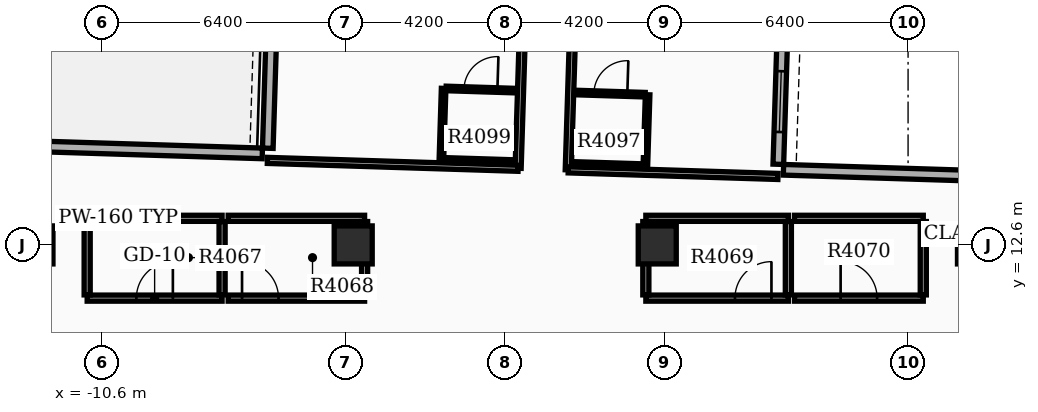
"""IFC4 building model, lengths in metres.
Left out: names, types, materials, properties, quantities, classifications, styles, units other than length and angle.
Written with IfcOpenShell. Run it as: python <this file> out.ifc"""

import sys

from ifc_helpers import new_model, si_unit, direction, frame, frame_2d, origin, origin_2d, place, context, subcontext, project, spatial, rectangle, extrude, element, fill, save


model = new_model("IFC4")
c1 = context("Model", 3, precision=1e-05, world=origin(), true_north=direction((0.0, 1.0)))
c2 = subcontext(c1, "Body", "Model", "MODEL_VIEW")
j1 = project(units=[si_unit("LENGTHUNIT", "METRE"), si_unit("PLANEANGLEUNIT", "RADIAN")], contexts=[c1])
p1 = place(None, origin())
s1 = spatial("IfcSite", under=j1, at=p1, CompositionType="ELEMENT")
p2 = place(p1, origin())
s2 = spatial("IfcBuilding", under=s1, at=p2, CompositionType="ELEMENT")
p3 = place(p2, frame((0.0, 0.0, 257.7)))
s3 = spatial("IfcBuildingStorey", under=s2, at=p3, CompositionType="ELEMENT", Elevation=257.7)
for number, where, z_axis, x_axis in (
    (1, (12.4, 12.6, 0.0), (0.0, 0.0, 1.0), (1.0, 0.0, 0.0)),
    (2, (-12.4, 12.6, 0.0), (0.0, 0.0, 1.0), (1.0, 0.0, 0.0)),
    (3, (4.0, 12.6, 0.0), (0.0, 0.0, 1.0), (1.0, 0.0, 0.0)),
    (4, (-4.0, 12.6, 0.0), (0.0, 0.0, 1.0), (1.0, 0.0, 0.0)),
):
    element("IfcColumn", number, at=place(p3, frame(where, z_axis=z_axis, x_axis=x_axis)), inside=s3, PredefinedType="COLUMN", context=c2, shape_type="SweptSolid", body=[
        extrude(rectangle(XDim=1.0, YDim=1.0, at=origin_2d()), origin(), (0.0, 0.0, 1.0), 3.9),
    ])
p4 = place(p3, frame((7.186, 14.721, 0.0), z_axis=(0.0, 0.0, 1.0), x_axis=(0.031405855522, 0.999506714454, 0.0)))
e5 = element("IfcWall", 5, at=p4, inside=s3, PredefinedType="STANDARD", context=c2, shape_type="SweptSolid", body=[
    extrude(rectangle(XDim=14.7, YDim=0.28, at=frame_2d((7.35, 0.0))), origin(), (0.0, 0.0, 1.0), 3.18),
])
p5 = place(p4, frame((0.85, 0.0, 0.8)))
e6 = element("IfcOpeningElement", 6, at=p5, cuts=e5, PredefinedType="OPENING", context=c2, shape_type="SweptSolid", body=[
    extrude(rectangle(XDim=1.6, YDim=1.7, at=frame_2d((0.8, 0.85))), frame((0.0, 0.15, 0.0), z_axis=(0.0, -1.0, 0.0), x_axis=(1.0, 0.0, 0.0)), (0.0, 0.0, 1.0), 0.3),
])
p6 = place(p4, frame((4.05, 0.0, 0.8)))
e7 = element("IfcOpeningElement", 7, at=p6, cuts=e5, PredefinedType="OPENING", context=c2, shape_type="SweptSolid", body=[
    extrude(rectangle(XDim=1.6, YDim=1.7, at=frame_2d((0.8, 0.85))), frame((0.0, 0.15, 0.0), z_axis=(0.0, -1.0, 0.0), x_axis=(1.0, 0.0, 0.0)), (0.0, 0.0, 1.0), 0.3),
])
p7 = place(p4, frame((7.25, 0.0, 0.8)))
e8 = element("IfcOpeningElement", 8, at=p7, cuts=e5, PredefinedType="OPENING", context=c2, shape_type="SweptSolid", body=[
    extrude(rectangle(XDim=1.6, YDim=1.7, at=frame_2d((0.8, 0.85))), frame((0.0, 0.15, 0.0), z_axis=(0.0, -1.0, 0.0), x_axis=(1.0, 0.0, 0.0)), (0.0, 0.0, 1.0), 0.3),
])
p8 = place(p4, frame((10.45, 0.0, 0.8)))
e9 = element("IfcOpeningElement", 9, at=p8, cuts=e5, PredefinedType="OPENING", context=c2, shape_type="SweptSolid", body=[
    extrude(rectangle(XDim=1.6, YDim=1.7, at=frame_2d((0.8, 0.85))), frame((0.0, 0.15, 0.0), z_axis=(0.0, -1.0, 0.0), x_axis=(1.0, 0.0, 0.0)), (0.0, 0.0, 1.0), 0.3),
])
p9 = place(p3, frame((-5.786, 29.836, 0.0), z_axis=(0.0, 0.0, 1.0), x_axis=(-0.031406376864, -0.999506698073, 0.0)))
e10 = element("IfcWall", 10, at=p9, inside=s3, PredefinedType="STANDARD", context=c2, shape_type="SweptSolid", body=[
    extrude(rectangle(XDim=14.7, YDim=0.28, at=frame_2d((7.35, 0.0))), origin(), (0.0, 0.0, 1.0), 3.18),
])
p10 = place(p9, frame((0.85, 0.0, 0.8)))
e11 = element("IfcOpeningElement", 11, at=p10, cuts=e10, PredefinedType="OPENING", context=c2, shape_type="SweptSolid", body=[
    extrude(rectangle(XDim=1.6, YDim=1.7, at=frame_2d((0.8, 0.85))), frame((0.0, 0.15, 0.0), z_axis=(0.0, -1.0, 0.0), x_axis=(1.0, 0.0, 0.0)), (0.0, 0.0, 1.0), 0.3),
])
p11 = place(p9, frame((4.05, 0.0, 0.8)))
e12 = element("IfcOpeningElement", 12, at=p11, cuts=e10, PredefinedType="OPENING", context=c2, shape_type="SweptSolid", body=[
    extrude(rectangle(XDim=1.6, YDim=1.7, at=frame_2d((0.8, 0.85))), frame((0.0, 0.15, 0.0), z_axis=(0.0, -1.0, 0.0), x_axis=(1.0, 0.0, 0.0)), (0.0, 0.0, 1.0), 0.3),
])
p12 = place(p9, frame((7.25, 0.0, 0.8)))
e13 = element("IfcOpeningElement", 13, at=p12, cuts=e10, PredefinedType="OPENING", context=c2, shape_type="SweptSolid", body=[
    extrude(rectangle(XDim=1.6, YDim=1.7, at=frame_2d((0.8, 0.85))), frame((0.0, 0.15, 0.0), z_axis=(0.0, -1.0, 0.0), x_axis=(1.0, 0.0, 0.0)), (0.0, 0.0, 1.0), 0.3),
])
p13 = place(p9, frame((9.6, 0.0, 0.0)))
e14 = element("IfcOpeningElement", 14, at=p13, cuts=e10, PredefinedType="OPENING", context=c2, shape_type="SweptSolid", body=[
    extrude(rectangle(XDim=0.96, YDim=2.1, at=frame_2d((0.48, 1.05))), frame((0.0, 0.15, 0.0), z_axis=(0.0, -1.0, 0.0), x_axis=(1.0, 0.0, 0.0)), (0.0, 0.0, 1.0), 0.3),
])
p14 = place(p3, frame((13.618, 14.379, 0.0), z_axis=(0.0, 0.0, 1.0), x_axis=(-0.999507224741, 0.031389611199, 0.0)))
e15 = element("IfcWall", 15, at=p14, inside=s3, PredefinedType="STANDARD", context=c2, shape_type="SweptSolid", body=[
    extrude(rectangle(XDim=6.3, YDim=0.28, at=frame_2d((3.15, 0.0))), origin(), (0.0, 0.0, 1.0), 3.18),
])
p15 = place(p3, frame((-12.689, 15.206, 0.0), z_axis=(0.0, 0.0, 1.0), x_axis=(0.999507262922, -0.031388395416, 0.0)))
e16 = element("IfcWall", 16, at=p15, inside=s3, PredefinedType="STANDARD", context=c2, shape_type="SweptSolid", body=[
    extrude(rectangle(XDim=6.3, YDim=0.28, at=frame_2d((3.15, 0.0))), origin(), (0.0, 0.0, 1.0), 3.18),
])
p16 = place(p3, frame((-11.0, 11.2, 0.0), z_axis=(0.0, 0.0, 1.0), x_axis=(1.0, 0.0, 0.0)))
e17 = element("IfcWall", 17, at=p16, inside=s3, PredefinedType="PARTITIONING", context=c2, shape_type="SweptSolid", body=[
    extrude(rectangle(XDim=3.55, YDim=0.16, at=frame_2d((1.775, 0.0))), origin(), (0.0, 0.0, 1.0), 3.17),
])
p17 = place(p16, frame((1.295, 0.0, 0.0)))
e18 = element("IfcOpeningElement", 18, at=p17, cuts=e17, PredefinedType="OPENING", context=c2, shape_type="SweptSolid", body=[
    extrude(rectangle(XDim=0.96, YDim=2.15, at=frame_2d((0.48, 1.075))), frame((0.0, 0.09, 0.0), z_axis=(0.0, -1.0, 0.0), x_axis=(1.0, 0.0, 0.0)), (0.0, 0.0, 1.0), 0.18),
])
p18 = place(p3, frame((-11.0, 13.3, 0.0), z_axis=(0.0, 0.0, 1.0), x_axis=(1.0, 0.0, 0.0)))
e19 = element("IfcWall", 19, at=p18, inside=s3, PredefinedType="PARTITIONING", context=c2, shape_type="SweptSolid", body=[
    extrude(rectangle(XDim=3.55, YDim=0.16, at=frame_2d((1.775, 0.0))), origin(), (0.0, 0.0, 1.0), 3.17),
])
for number, where, z_axis, x_axis in (
    (20, (-11.0, 11.285, 0.0), (0.0, 0.0, 1.0), (0.0, 1.0, 0.0)),
    (21, (-7.45, 11.285, 0.0), (0.0, 0.0, 1.0), (0.0, 1.0, 0.0)),
):
    element("IfcWall", number, at=place(p3, frame(where, z_axis=z_axis, x_axis=x_axis)), inside=s3, PredefinedType="PARTITIONING", context=c2, shape_type="SweptSolid", body=[
        extrude(rectangle(XDim=1.93, YDim=0.16, at=frame_2d((0.965, 0.0))), origin(), (0.0, 0.0, 1.0), 3.17),
    ])
p19 = place(p3, frame((-7.29, 11.2, 0.0), z_axis=(0.0, 0.0, 1.0), x_axis=(1.0, 0.0, 0.0)))
e22 = element("IfcWall", 22, at=p19, inside=s3, PredefinedType="PARTITIONING", context=c2, shape_type="SweptSolid", body=[
    extrude(rectangle(XDim=3.59, YDim=0.16, at=frame_2d((1.795, 0.0))), origin(), (0.0, 0.0, 1.0), 3.17),
])
p20 = place(p19, frame((0.365, 0.0, 0.0)))
e23 = element("IfcOpeningElement", 23, at=p20, cuts=e22, PredefinedType="OPENING", context=c2, shape_type="SweptSolid", body=[
    extrude(rectangle(XDim=0.96, YDim=2.15, at=frame_2d((0.48, 1.075))), frame((0.0, 0.09, 0.0), z_axis=(0.0, -1.0, 0.0), x_axis=(1.0, 0.0, 0.0)), (0.0, 0.0, 1.0), 0.18),
])
p21 = place(p3, frame((-7.29, 13.3, 0.0), z_axis=(0.0, 0.0, 1.0), x_axis=(1.0, 0.0, 0.0)))
e24 = element("IfcWall", 24, at=p21, inside=s3, PredefinedType="PARTITIONING", context=c2, shape_type="SweptSolid", body=[
    extrude(rectangle(XDim=3.59, YDim=0.16, at=frame_2d((1.795, 0.0))), origin(), (0.0, 0.0, 1.0), 3.17),
])
p22 = place(p3, frame((-3.7, 11.285, 0.0), z_axis=(0.0, 0.0, 1.0), x_axis=(0.0, 1.0, 0.0)))
e25 = element("IfcWall", 25, at=p22, inside=s3, PredefinedType="PARTITIONING", context=c2, shape_type="SweptSolid", body=[
    extrude(rectangle(XDim=1.93, YDim=0.16, at=frame_2d((0.965, 0.0))), origin(), (0.0, 0.0, 1.0), 3.17),
])
p23 = place(p3, frame((3.7, 11.2, 0.0), z_axis=(0.0, 0.0, 1.0), x_axis=(1.0, 0.0, 0.0)))
e26 = element("IfcWall", 26, at=p23, inside=s3, PredefinedType="PARTITIONING", context=c2, shape_type="SweptSolid", body=[
    extrude(rectangle(XDim=3.75, YDim=0.16, at=frame_2d((1.875, 0.0))), origin(), (0.0, 0.0, 1.0), 3.17),
])
p24 = place(p23, frame((2.345, 0.0, 0.0)))
e27 = element("IfcOpeningElement", 27, at=p24, cuts=e26, PredefinedType="OPENING", context=c2, shape_type="SweptSolid", body=[
    extrude(rectangle(XDim=0.96, YDim=2.15, at=frame_2d((0.48, 1.075))), frame((0.0, 0.09, 0.0), z_axis=(0.0, -1.0, 0.0), x_axis=(1.0, 0.0, 0.0)), (0.0, 0.0, 1.0), 0.18),
])
p25 = place(p3, frame((3.7, 13.3, 0.0), z_axis=(0.0, 0.0, 1.0), x_axis=(1.0, 0.0, 0.0)))
e28 = element("IfcWall", 28, at=p25, inside=s3, PredefinedType="PARTITIONING", context=c2, shape_type="SweptSolid", body=[
    extrude(rectangle(XDim=3.75, YDim=0.16, at=frame_2d((1.875, 0.0))), origin(), (0.0, 0.0, 1.0), 3.17),
])
for number, where, z_axis, x_axis in (
    (29, (3.7, 11.285, 0.0), (0.0, 0.0, 1.0), (0.0, 1.0, 0.0)),
    (30, (7.45, 11.285, 0.0), (0.0, 0.0, 1.0), (0.0, 1.0, 0.0)),
):
    element("IfcWall", number, at=place(p3, frame(where, z_axis=z_axis, x_axis=x_axis)), inside=s3, PredefinedType="PARTITIONING", context=c2, shape_type="SweptSolid", body=[
        extrude(rectangle(XDim=1.93, YDim=0.16, at=frame_2d((0.965, 0.0))), origin(), (0.0, 0.0, 1.0), 3.17),
    ])
p26 = place(p3, frame((7.61, 11.2, 0.0), z_axis=(0.0, 0.0, 1.0), x_axis=(1.0, 0.0, 0.0)))
e31 = element("IfcWall", 31, at=p26, inside=s3, PredefinedType="PARTITIONING", context=c2, shape_type="SweptSolid", body=[
    extrude(rectangle(XDim=3.39, YDim=0.16, at=frame_2d((1.695, 0.0))), origin(), (0.0, 0.0, 1.0), 3.17),
])
p27 = place(p26, frame((1.215, 0.0, 0.0)))
e32 = element("IfcOpeningElement", 32, at=p27, cuts=e31, PredefinedType="OPENING", context=c2, shape_type="SweptSolid", body=[
    extrude(rectangle(XDim=0.96, YDim=2.15, at=frame_2d((0.48, 1.075))), frame((0.0, 0.09, 0.0), z_axis=(0.0, -1.0, 0.0), x_axis=(1.0, 0.0, 0.0)), (0.0, 0.0, 1.0), 0.18),
])
p28 = place(p3, frame((7.61, 13.3, 0.0), z_axis=(0.0, 0.0, 1.0), x_axis=(1.0, 0.0, 0.0)))
e33 = element("IfcWall", 33, at=p28, inside=s3, PredefinedType="PARTITIONING", context=c2, shape_type="SweptSolid", body=[
    extrude(rectangle(XDim=3.39, YDim=0.16, at=frame_2d((1.695, 0.0))), origin(), (0.0, 0.0, 1.0), 3.17),
])
p29 = place(p3, frame((11.0, 11.285, 0.0), z_axis=(0.0, 0.0, 1.0), x_axis=(0.0, 1.0, 0.0)))
e34 = element("IfcWall", 34, at=p29, inside=s3, PredefinedType="PARTITIONING", context=c2, shape_type="SweptSolid", body=[
    extrude(rectangle(XDim=1.93, YDim=0.16, at=frame_2d((0.965, 0.0))), origin(), (0.0, 0.0, 1.0), 3.17),
])
p30 = place(p3, frame((1.659, 14.575, 0.0), z_axis=(0.0, 0.0, 1.0), x_axis=(0.031404333983, 0.999506762262, 0.0)))
e35 = element("IfcWall", 35, at=p30, inside=s3, PredefinedType="PARTITIONING", context=c2, shape_type="SweptSolid", body=[
    extrude(rectangle(XDim=15.012, YDim=0.16, at=frame_2d((7.506, 0.0))), origin(), (0.0, 0.0, 1.0), 3.17),
])
p31 = place(p30, frame((13.76, 0.0, 0.0)))
e36 = element("IfcOpeningElement", 36, at=p31, cuts=e35, PredefinedType="OPENING", context=c2, shape_type="SweptSolid", body=[
    extrude(rectangle(XDim=0.96, YDim=2.15, at=frame_2d((0.48, 1.075))), frame((0.0, 0.09, 0.0), z_axis=(0.0, -1.0, 0.0), x_axis=(1.0, 0.0, 0.0)), (0.0, 0.0, 1.0), 0.18),
])
p32 = place(p3, frame((1.659, 14.575, 0.0), z_axis=(0.0, 0.0, 1.0), x_axis=(0.999505408206, -0.031447400002, 0.0)))
e37 = element("IfcWall", 37, at=p32, inside=s3, PredefinedType="PARTITIONING", context=c2, shape_type="SweptSolid", body=[
    extrude(rectangle(XDim=5.52, YDim=0.16, at=frame_2d((2.76, 0.0))), origin(), (0.0, 0.0, 1.0), 3.17),
])
p33 = place(p3, frame((1.863, 16.61, 0.0), z_axis=(0.0, 0.0, 1.0), x_axis=(0.999507221803, -0.031389704724, 0.0)))
e38 = element("IfcWall", 38, at=p33, inside=s3, PredefinedType="PARTITIONING", context=c2, shape_type="SweptSolid", body=[
    extrude(rectangle(XDim=1.82, YDim=0.12, at=frame_2d((0.91, 0.0))), origin(), (0.0, 0.0, 1.0), 3.17),
])
p34 = place(p33, frame((0.47, 0.0, 0.0)))
e39 = element("IfcOpeningElement", 39, at=p34, cuts=e38, PredefinedType="OPENING", context=c2, shape_type="SweptSolid", body=[
    extrude(rectangle(XDim=0.88, YDim=2.1, at=frame_2d((0.44, 1.05))), frame((0.0, 0.07, 0.0), z_axis=(0.0, -1.0, 0.0), x_axis=(1.0, 0.0, 0.0)), (0.0, 0.0, 1.0), 0.14),
])
p35 = place(p3, frame((1.804, 14.731, 0.0), z_axis=(0.0, 0.0, 1.0), x_axis=(0.999503004171, -0.03152371574, 0.0)))
e40 = element("IfcWall", 40, at=p35, inside=s3, PredefinedType="PARTITIONING", context=c2, shape_type="SweptSolid", body=[
    extrude(rectangle(XDim=1.82, YDim=0.12, at=frame_2d((0.91, 0.0))), origin(), (0.0, 0.0, 1.0), 3.17),
])
p36 = place(p3, frame((3.688, 14.671, 0.0), z_axis=(0.0, 0.0, 1.0), x_axis=(0.031295563454, 0.999510173889, 0.0)))
e41 = element("IfcWall", 41, at=p36, inside=s3, PredefinedType="PARTITIONING", context=c2, shape_type="SweptSolid", body=[
    extrude(rectangle(XDim=1.88, YDim=0.12, at=frame_2d((0.94, 0.0))), origin(), (0.0, 0.0, 1.0), 3.17),
])
p37 = place(p3, frame((0.339, 14.617, 0.0), z_axis=(0.0, 0.0, 1.0), x_axis=(0.031404333983, 0.999506762262, 0.0)))
e42 = element("IfcWall", 42, at=p37, inside=s3, PredefinedType="PARTITIONING", context=c2, shape_type="SweptSolid", body=[
    extrude(rectangle(XDim=15.012, YDim=0.16, at=frame_2d((7.506, 0.0))), origin(), (0.0, 0.0, 1.0), 3.17),
])
p38 = place(p37, frame((13.76, 0.0, 0.0)))
e43 = element("IfcOpeningElement", 43, at=p38, cuts=e42, PredefinedType="OPENING", context=c2, shape_type="SweptSolid", body=[
    extrude(rectangle(XDim=0.96, YDim=2.15, at=frame_2d((0.48, 1.075))), frame((0.0, 0.09, 0.0), z_axis=(0.0, -1.0, 0.0), x_axis=(1.0, 0.0, 0.0)), (0.0, 0.0, 1.0), 0.18),
])
p39 = place(p3, frame((0.339, 14.617, 0.0), z_axis=(0.0, 0.0, 1.0), x_axis=(-0.999506756764, 0.031404508956, 0.0)))
e44 = element("IfcWall", 44, at=p39, inside=s3, PredefinedType="PARTITIONING", context=c2, shape_type="SweptSolid", body=[
    extrude(rectangle(XDim=6.6, YDim=0.16, at=frame_2d((3.3, 0.0))), origin(), (0.0, 0.0, 1.0), 3.17),
])
p40 = place(p3, frame((-1.556, 16.717, 0.0), z_axis=(0.0, 0.0, 1.0), x_axis=(0.999507221803, -0.031389704724, 0.0)))
e45 = element("IfcWall", 45, at=p40, inside=s3, PredefinedType="PARTITIONING", context=c2, shape_type="SweptSolid", body=[
    extrude(rectangle(XDim=1.82, YDim=0.12, at=frame_2d((0.91, 0.0))), origin(), (0.0, 0.0, 1.0), 3.17),
])
p41 = place(p40, frame((0.47, 0.0, 0.0)))
e46 = element("IfcOpeningElement", 46, at=p41, cuts=e45, PredefinedType="OPENING", context=c2, shape_type="SweptSolid", body=[
    extrude(rectangle(XDim=0.88, YDim=2.1, at=frame_2d((0.44, 1.05))), frame((0.0, 0.07, 0.0), z_axis=(0.0, -1.0, 0.0), x_axis=(1.0, 0.0, 0.0)), (0.0, 0.0, 1.0), 0.14),
])
p42 = place(p3, frame((-1.615, 14.838, 0.0), z_axis=(0.0, 0.0, 1.0), x_axis=(0.999511421504, -0.031255692016, 0.0)))
e47 = element("IfcWall", 47, at=p42, inside=s3, PredefinedType="PARTITIONING", context=c2, shape_type="SweptSolid", body=[
    extrude(rectangle(XDim=1.82, YDim=0.12, at=frame_2d((0.91, 0.0))), origin(), (0.0, 0.0, 1.0), 3.17),
])
p43 = place(p3, frame((-1.68, 14.84, 0.0), z_axis=(0.0, 0.0, 1.0), x_axis=(0.031425292588, 0.999506103526, 0.0)))
e48 = element("IfcWall", 48, at=p43, inside=s3, PredefinedType="PARTITIONING", context=c2, shape_type="SweptSolid", body=[
    extrude(rectangle(XDim=1.88, YDim=0.12, at=frame_2d((0.94, 0.0))), origin(), (0.0, 0.0, 1.0), 3.17),
])
p44 = place(p5, origin())
e49 = element("IfcWindow", 49, at=p44, inside=s3, PartitioningType="SINGLE_PANEL", PredefinedType="WINDOW", context=c2, shape_type="SweptSolid", body=[
    extrude(rectangle(XDim=1.6, YDim=1.7, at=frame_2d((0.8, 0.85))), frame((0.0, 0.03, 0.0), z_axis=(0.0, -1.0, 0.0), x_axis=(1.0, 0.0, 0.0)), (0.0, 0.0, 1.0), 0.06),
])
fill(e6, e49)
p45 = place(p17, origin())
e50 = element("IfcDoor", 50, at=p45, inside=s3, OperationType="SINGLE_SWING_RIGHT", PredefinedType="DOOR", context=c2, shape_type="SweptSolid", body=[
    extrude(rectangle(XDim=0.96, YDim=2.15, at=frame_2d((0.48, 1.075))), frame((0.0, 0.025, 0.0), z_axis=(0.0, -1.0, 0.0), x_axis=(1.0, 0.0, 0.0)), (0.0, 0.0, 1.0), 0.05),
])
fill(e18, e50)
p46 = place(p20, origin())
e51 = element("IfcDoor", 51, at=p46, inside=s3, OperationType="SINGLE_SWING_LEFT", PredefinedType="DOOR", context=c2, shape_type="SweptSolid", body=[
    extrude(rectangle(XDim=0.96, YDim=2.15, at=frame_2d((0.48, 1.075))), frame((0.0, 0.025, 0.0), z_axis=(0.0, -1.0, 0.0), x_axis=(1.0, 0.0, 0.0)), (0.0, 0.0, 1.0), 0.05),
])
fill(e23, e51)
p47 = place(p24, origin())
e52 = element("IfcDoor", 52, at=p47, inside=s3, OperationType="SINGLE_SWING_RIGHT", PredefinedType="DOOR", context=c2, shape_type="SweptSolid", body=[
    extrude(rectangle(XDim=0.96, YDim=2.15, at=frame_2d((0.48, 1.075))), frame((0.0, 0.025, 0.0), z_axis=(0.0, -1.0, 0.0), x_axis=(1.0, 0.0, 0.0)), (0.0, 0.0, 1.0), 0.05),
])
fill(e27, e52)
p48 = place(p27, origin())
e53 = element("IfcDoor", 53, at=p48, inside=s3, OperationType="SINGLE_SWING_LEFT", PredefinedType="DOOR", context=c2, shape_type="SweptSolid", body=[
    extrude(rectangle(XDim=0.96, YDim=2.15, at=frame_2d((0.48, 1.075))), frame((0.0, 0.025, 0.0), z_axis=(0.0, -1.0, 0.0), x_axis=(1.0, 0.0, 0.0)), (0.0, 0.0, 1.0), 0.05),
])
fill(e32, e53)
p49 = place(p34, origin())
e54 = element("IfcDoor", 54, at=p49, inside=s3, OperationType="SINGLE_SWING_RIGHT", PredefinedType="DOOR", context=c2, shape_type="SweptSolid", body=[
    extrude(rectangle(XDim=0.88, YDim=2.1, at=frame_2d((0.44, 1.05))), frame((0.0, 0.025, 0.0), z_axis=(0.0, -1.0, 0.0), x_axis=(1.0, 0.0, 0.0)), (0.0, 0.0, 1.0), 0.05),
])
fill(e39, e54)
p50 = place(p41, origin())
e55 = element("IfcDoor", 55, at=p50, inside=s3, OperationType="SINGLE_SWING_RIGHT", PredefinedType="DOOR", context=c2, shape_type="SweptSolid", body=[
    extrude(rectangle(XDim=0.88, YDim=2.1, at=frame_2d((0.44, 1.05))), frame((0.0, 0.025, 0.0), z_axis=(0.0, -1.0, 0.0), x_axis=(1.0, 0.0, 0.0)), (0.0, 0.0, 1.0), 0.05),
])
fill(e46, e55)
save(model, sys.argv[1])
